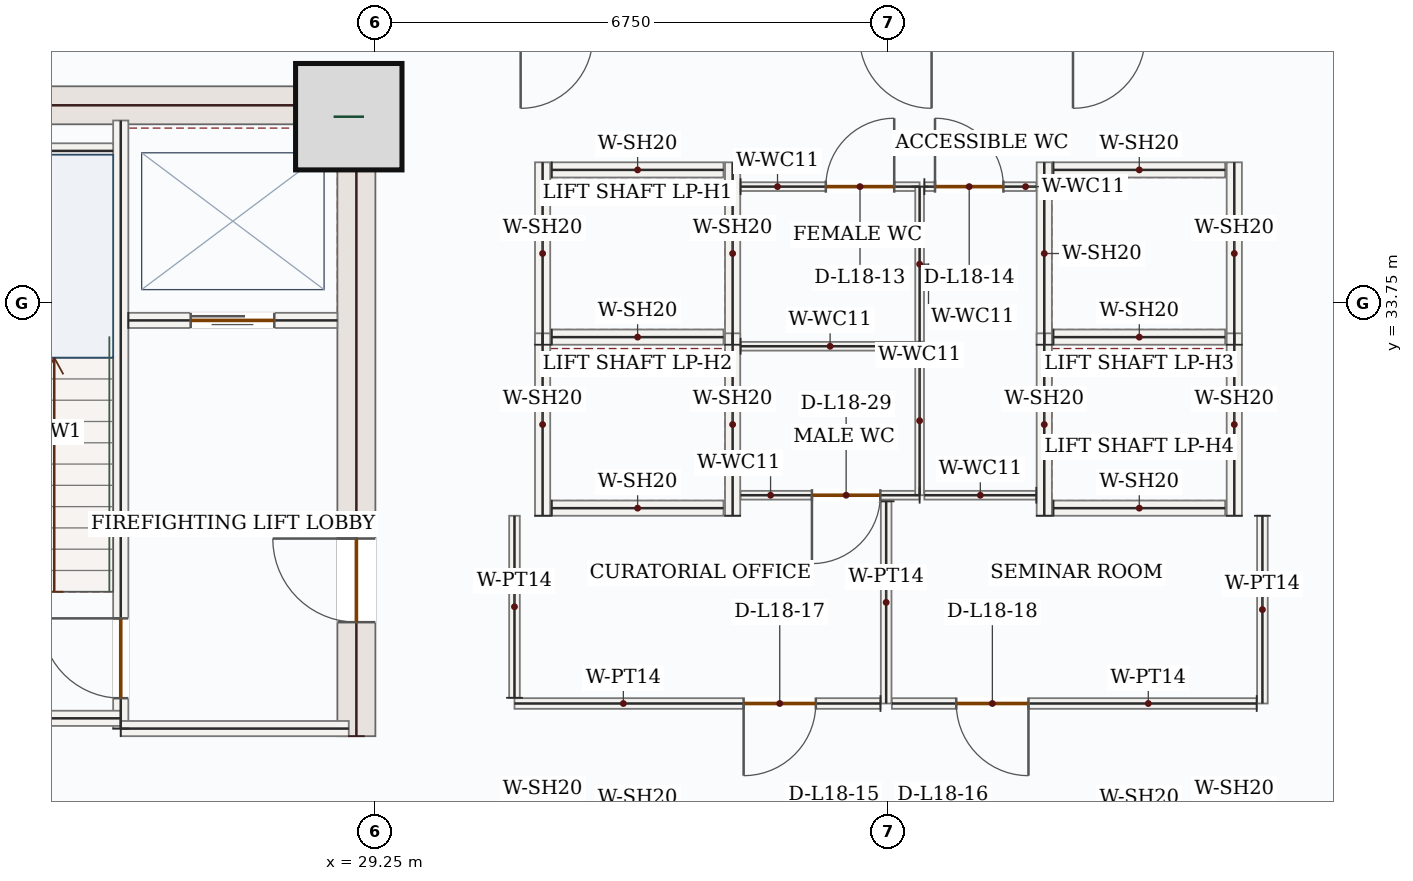
"""IFC4 building model, lengths in metres.
Left out: names, types, materials, properties, quantities, classifications, styles, units other than length and angle.
Written with IfcOpenShell. Run it as: python <this file> out.ifc"""

import sys

from ifc_helpers import new_model, si_unit, direction, frame, frame_2d, origin, origin_2d, place, context, subcontext, project, spatial, rectangle, extrude, source, transform, mapped, element, fill, save


model = new_model("IFC4")
c1 = context("Model", 3, precision=1e-05, world=origin(), true_north=direction((0.0, 1.0)))
c2 = subcontext(c1, "Body", "Model", "MODEL_VIEW")
j1 = project(units=[si_unit("LENGTHUNIT", "METRE"), si_unit("PLANEANGLEUNIT", "RADIAN")], contexts=[c1])
p1 = place(None, origin())
s1 = spatial("IfcSite", under=j1, at=p1, CompositionType="ELEMENT")
p2 = place(p1, origin())
s2 = spatial("IfcBuilding", under=s1, at=p2, CompositionType="ELEMENT")
p3 = place(p2, frame((0.0, 0.0, 83.7)))
s3 = spatial("IfcBuildingStorey", under=s2, at=p3, CompositionType="ELEMENT", Elevation=83.7)
p4 = place(p3, frame((29.0, 28.05, 0.0), z_axis=(0.0, 0.0, 1.0), x_axis=(0.0, 1.0, 0.0)))
e1 = element("IfcWall", 1, at=p4, inside=s3, PredefinedType="SHEAR", context=c2, shape_type="SweptSolid", body=[
    extrude(rectangle(XDim=8.55, YDim=0.5, at=frame_2d((4.275, 0.0))), origin(), (0.0, 0.0, 1.0), 3.95),
])
p5 = place(p4, frame((1.5, 0.0, 0.0)))
e2 = element("IfcOpeningElement", 2, at=p5, cuts=e1, PredefinedType="OPENING", context=c2, shape_type="SweptSolid", body=[
    extrude(rectangle(XDim=1.1, YDim=2.2, at=frame_2d((0.55, 1.1))), frame((0.0, 0.26, 0.0), z_axis=(0.0, -1.0, 0.0), x_axis=(1.0, 0.0, 0.0)), (0.0, 0.0, 1.0), 0.52),
])
m1 = source(origin(), c2, "Body", "SweptSolid", [
    extrude(rectangle(XDim=7.0, YDim=0.5, at=frame_2d((3.5, 0.0))), origin(), (0.0, 0.0, 1.0), 3.95),
])
p6 = place(p3, frame((21.75, 36.35, 0.0), z_axis=(0.0, 0.0, 1.0), x_axis=(1.0, 0.0, 0.0)))
e3 = element("IfcWall", 3, at=p6, inside=s3, PredefinedType="SHEAR", context=c2, shape_type="MappedRepresentation", body=[
    mapped(m1, transform((0.0, 0.0, 0.0), x_axis=(1.0, 0.0, 0.0), y_axis=(0.0, 1.0, 0.0), z_axis=(0.0, 0.0, 1.0), scale=1.0)),
])
m2 = source(origin(), c2, "Body", "SweptSolid", [
    extrude(rectangle(XDim=1.4, YDim=1.4, at=origin_2d()), origin(), (0.0, 0.0, 1.0), 4.2),
])
p7 = place(p3, frame((28.9, 36.2, 0.0), z_axis=(0.0, 0.0, 1.0), x_axis=(1.0, 0.0, 0.0)))
e4 = element("IfcColumn", 4, at=p7, inside=s3, PredefinedType="COLUMN", context=c2, shape_type="MappedRepresentation", body=[
    mapped(m2, transform((0.0, 0.0, 0.0), x_axis=(1.0, 0.0, 0.0), y_axis=(0.0, 1.0, 0.0), z_axis=(0.0, 0.0, 1.0), scale=1.0)),
])
p8 = place(p3, frame((25.9, 28.15, 0.0), z_axis=(0.0, 0.0, 1.0), x_axis=(0.0, 1.0, 0.0)))
e5 = element("IfcWall", 5, at=p8, inside=s3, PredefinedType="SOLIDWALL", context=c2, shape_type="SweptSolid", body=[
    extrude(rectangle(XDim=8.0, YDim=0.2, at=frame_2d((4.0, 0.0))), origin(), (0.0, 0.0, 1.0), 3.95),
])
p9 = place(p8, frame((0.4, 0.0, 0.0)))
e6 = element("IfcOpeningElement", 6, at=p9, cuts=e5, PredefinedType="OPENING", context=c2, shape_type="SweptSolid", body=[
    extrude(rectangle(XDim=1.05, YDim=2.15, at=frame_2d((0.525, 1.075))), frame((0.0, 0.11, 0.0), z_axis=(0.0, -1.0, 0.0), x_axis=(1.0, 0.0, 0.0)), (0.0, 0.0, 1.0), 0.22),
])
m3 = source(origin(), c2, "Body", "SweptSolid", [
    extrude(rectangle(XDim=4.25, YDim=0.2, at=frame_2d((2.125, 0.0))), origin(), (0.0, 0.0, 1.0), 3.95),
])
p10 = place(p3, frame((21.65, 28.285, 0.0), z_axis=(0.0, 0.0, 1.0), x_axis=(1.0, 0.0, 0.0)))
e7 = element("IfcWall", 7, at=p10, inside=s3, PredefinedType="SOLIDWALL", context=c2, shape_type="MappedRepresentation", body=[
    mapped(m3, transform((0.0, 0.0, 0.0), x_axis=(1.0, 0.0, 0.0), y_axis=(0.0, 1.0, 0.0), z_axis=(0.0, 0.0, 1.0), scale=1.0)),
])
m4 = source(origin(), c2, "Body", "SweptSolid", [
    extrude(rectangle(XDim=3.0, YDim=0.2, at=frame_2d((1.5, 0.0))), origin(), (0.0, 0.0, 1.0), 3.95),
])
p11 = place(p3, frame((25.9, 28.15, 0.0), z_axis=(0.0, 0.0, 1.0), x_axis=(1.0, 0.0, 0.0)))
e8 = element("IfcWall", 8, at=p11, inside=s3, PredefinedType="SOLIDWALL", context=c2, shape_type="MappedRepresentation", body=[
    mapped(m4, transform((0.0, 0.0, 0.0), x_axis=(1.0, 0.0, 0.0), y_axis=(0.0, 1.0, 0.0), z_axis=(0.0, 0.0, 1.0), scale=1.0)),
])
m5 = source(origin(), c2, "Body", "SweptSolid", [
    extrude(rectangle(XDim=3.25, YDim=0.2, at=frame_2d((1.625, 0.0))), origin(), (0.0, 0.0, 1.0), 3.95),
])
p12 = place(p3, frame((22.55, 35.75, 0.0), z_axis=(0.0, 0.0, 1.0), x_axis=(1.0, 0.0, 0.0)))
e9 = element("IfcWall", 9, at=p12, inside=s3, PredefinedType="SOLIDWALL", context=c2, shape_type="MappedRepresentation", body=[
    mapped(m5, transform((0.0, 0.0, 0.0), x_axis=(1.0, 0.0, 0.0), y_axis=(0.0, 1.0, 0.0), z_axis=(0.0, 0.0, 1.0), scale=1.0)),
])
p13 = place(p3, frame((26.0, 33.52, 0.0), z_axis=(0.0, 0.0, 1.0), x_axis=(1.0, 0.0, 0.0)))
e10 = element("IfcWall", 10, at=p13, inside=s3, PredefinedType="SOLIDWALL", context=c2, shape_type="SweptSolid", body=[
    extrude(rectangle(XDim=2.75, YDim=0.2, at=frame_2d((1.375, 0.0))), origin(), (0.0, 0.0, 1.0), 3.95),
])
p14 = place(p13, frame((0.82, 0.0, 0.0)))
e11 = element("IfcOpeningElement", 11, at=p14, cuts=e10, PredefinedType="OPENING", context=c2, shape_type="SweptSolid", body=[
    extrude(rectangle(XDim=1.1, YDim=2.15, at=frame_2d((0.55, 1.075))), frame((0.0, 0.11, 0.0), z_axis=(0.0, -1.0, 0.0), x_axis=(1.0, 0.0, 0.0)), (0.0, 0.0, 1.0), 0.22),
])
m6 = source(origin(), c2, "Body", "SweptSolid", [
    extrude(rectangle(XDim=2.4, YDim=0.2, at=frame_2d((1.2, 0.0))), origin(), (0.0, 0.0, 1.0), 3.95),
])
for number, where, z_axis, x_axis in (
    (12, (31.45, 33.2, 0.0), (0.0, 0.0, 1.0), (0.0, 1.0, 0.0)),
    (13, (33.95, 33.2, 0.0), (0.0, 0.0, 1.0), (0.0, 1.0, 0.0)),
):
    element("IfcWall", number, at=place(p3, frame(where, z_axis=z_axis, x_axis=x_axis)), inside=s3, PredefinedType="SOLIDWALL", context=c2, shape_type="MappedRepresentation", body=[
        mapped(m6, transform((0.0, 0.0, 0.0), x_axis=(1.0, 0.0, 0.0), y_axis=(0.0, 1.0, 0.0), z_axis=(0.0, 0.0, 1.0), scale=1.0)),
    ])
m7 = source(origin(), c2, "Body", "SweptSolid", [
    extrude(rectangle(XDim=2.26, YDim=0.2, at=frame_2d((1.13, 0.0))), origin(), (0.0, 0.0, 1.0), 3.95),
])
for number, where, z_axis, x_axis in (
    (14, (31.57, 33.3, 0.0), (0.0, 0.0, 1.0), (1.0, 0.0, 0.0)),
    (15, (31.57, 35.5, 0.0), (0.0, 0.0, 1.0), (1.0, 0.0, 0.0)),
):
    element("IfcWall", number, at=place(p3, frame(where, z_axis=z_axis, x_axis=x_axis)), inside=s3, PredefinedType="SOLIDWALL", context=c2, shape_type="MappedRepresentation", body=[
        mapped(m7, transform((0.0, 0.0, 0.0), x_axis=(1.0, 0.0, 0.0), y_axis=(0.0, 1.0, 0.0), z_axis=(0.0, 0.0, 1.0), scale=1.0)),
    ])
for number, where, z_axis, x_axis in (
    (16, (31.45, 30.95, 0.0), (0.0, 0.0, 1.0), (0.0, 1.0, 0.0)),
    (17, (33.95, 30.95, 0.0), (0.0, 0.0, 1.0), (0.0, 1.0, 0.0)),
):
    element("IfcWall", number, at=place(p3, frame(where, z_axis=z_axis, x_axis=x_axis)), inside=s3, PredefinedType="SOLIDWALL", context=c2, shape_type="MappedRepresentation", body=[
        mapped(m6, transform((0.0, 0.0, 0.0), x_axis=(1.0, 0.0, 0.0), y_axis=(0.0, 1.0, 0.0), z_axis=(0.0, 0.0, 1.0), scale=1.0)),
    ])
p15 = place(p3, frame((31.57, 31.05, 0.0), z_axis=(0.0, 0.0, 1.0), x_axis=(1.0, 0.0, 0.0)))
e18 = element("IfcWall", 18, at=p15, inside=s3, PredefinedType="SOLIDWALL", context=c2, shape_type="MappedRepresentation", body=[
    mapped(m7, transform((0.0, 0.0, 0.0), x_axis=(1.0, 0.0, 0.0), y_axis=(0.0, 1.0, 0.0), z_axis=(0.0, 0.0, 1.0), scale=1.0)),
])
for number, where, z_axis, x_axis in (
    (19, (38.05, 33.2, 0.0), (0.0, 0.0, 1.0), (0.0, 1.0, 0.0)),
    (20, (40.55, 33.2, 0.0), (0.0, 0.0, 1.0), (0.0, 1.0, 0.0)),
):
    element("IfcWall", number, at=place(p3, frame(where, z_axis=z_axis, x_axis=x_axis)), inside=s3, PredefinedType="SOLIDWALL", context=c2, shape_type="MappedRepresentation", body=[
        mapped(m6, transform((0.0, 0.0, 0.0), x_axis=(1.0, 0.0, 0.0), y_axis=(0.0, 1.0, 0.0), z_axis=(0.0, 0.0, 1.0), scale=1.0)),
    ])
for number, where, z_axis, x_axis in (
    (21, (38.17, 33.3, 0.0), (0.0, 0.0, 1.0), (1.0, 0.0, 0.0)),
    (22, (38.17, 35.5, 0.0), (0.0, 0.0, 1.0), (1.0, 0.0, 0.0)),
):
    element("IfcWall", number, at=place(p3, frame(where, z_axis=z_axis, x_axis=x_axis)), inside=s3, PredefinedType="SOLIDWALL", context=c2, shape_type="MappedRepresentation", body=[
        mapped(m7, transform((0.0, 0.0, 0.0), x_axis=(1.0, 0.0, 0.0), y_axis=(0.0, 1.0, 0.0), z_axis=(0.0, 0.0, 1.0), scale=1.0)),
    ])
for number, where, z_axis, x_axis in (
    (23, (38.05, 30.95, 0.0), (0.0, 0.0, 1.0), (0.0, 1.0, 0.0)),
    (24, (40.55, 30.95, 0.0), (0.0, 0.0, 1.0), (0.0, 1.0, 0.0)),
):
    element("IfcWall", number, at=place(p3, frame(where, z_axis=z_axis, x_axis=x_axis)), inside=s3, PredefinedType="SOLIDWALL", context=c2, shape_type="MappedRepresentation", body=[
        mapped(m6, transform((0.0, 0.0, 0.0), x_axis=(1.0, 0.0, 0.0), y_axis=(0.0, 1.0, 0.0), z_axis=(0.0, 0.0, 1.0), scale=1.0)),
    ])
p16 = place(p3, frame((38.17, 31.05, 0.0), z_axis=(0.0, 0.0, 1.0), x_axis=(1.0, 0.0, 0.0)))
e25 = element("IfcWall", 25, at=p16, inside=s3, PredefinedType="SOLIDWALL", context=c2, shape_type="MappedRepresentation", body=[
    mapped(m7, transform((0.0, 0.0, 0.0), x_axis=(1.0, 0.0, 0.0), y_axis=(0.0, 1.0, 0.0), z_axis=(0.0, 0.0, 1.0), scale=1.0)),
])
p17 = place(p3, frame((36.41, 31.22, 0.0), z_axis=(0.0, 0.0, 1.0), x_axis=(-1.0, 0.0, 0.0)))
e26 = element("IfcWall", 26, at=p17, inside=s3, PredefinedType="PARTITIONING", context=c2, shape_type="SweptSolid", body=[
    extrude(rectangle(XDim=2.355, YDim=0.115, at=frame_2d((1.177, 0.0))), origin(), (0.0, 0.0, 1.0), 3.95),
])
p18 = place(p17, frame((0.517, 0.0, 0.0)))
e27 = element("IfcOpeningElement", 27, at=p18, cuts=e26, PredefinedType="OPENING", context=c2, shape_type="SweptSolid", body=[
    extrude(rectangle(XDim=0.9, YDim=2.1, at=frame_2d((0.45, 1.05))), frame((0.0, 0.067, 0.0), z_axis=(0.0, -1.0, 0.0), x_axis=(1.0, 0.0, 0.0)), (0.0, 0.0, 1.0), 0.135),
])
m8 = source(origin(), c2, "Body", "SweptSolid", [
    extrude(rectangle(XDim=2.355, YDim=0.115, at=frame_2d((1.177, 0.0))), origin(), (0.0, 0.0, 1.0), 3.95),
])
p19 = place(p3, frame((34.055, 33.18, 0.0), z_axis=(0.0, 0.0, 1.0), x_axis=(1.0, 0.0, 0.0)))
e28 = element("IfcWall", 28, at=p19, inside=s3, PredefinedType="PARTITIONING", context=c2, shape_type="MappedRepresentation", body=[
    mapped(m8, transform((0.0, 0.0, 0.0), x_axis=(1.0, 0.0, 0.0), y_axis=(0.0, 1.0, 0.0), z_axis=(0.0, 0.0, 1.0), scale=1.0)),
])
m9 = source(origin(), c2, "Body", "SweptSolid", [
    extrude(rectangle(XDim=1.96, YDim=0.115, at=frame_2d((0.98, 0.0))), origin(), (0.0, 0.0, 1.0), 3.95),
])
p20 = place(p3, frame((36.41, 33.18, 0.0), z_axis=(0.0, 0.0, 1.0), x_axis=(0.0, -1.0, 0.0)))
e29 = element("IfcWall", 29, at=p20, inside=s3, PredefinedType="PARTITIONING", context=c2, shape_type="MappedRepresentation", body=[
    mapped(m9, transform((0.0, 0.0, 0.0), x_axis=(1.0, 0.0, 0.0), y_axis=(0.0, 1.0, 0.0), z_axis=(0.0, 0.0, 1.0), scale=1.0)),
])
p21 = place(p3, frame((34.055, 35.28, 0.0), z_axis=(0.0, 0.0, 1.0), x_axis=(1.0, 0.0, 0.0)))
e30 = element("IfcWall", 30, at=p21, inside=s3, PredefinedType="PARTITIONING", context=c2, shape_type="SweptSolid", body=[
    extrude(rectangle(XDim=2.355, YDim=0.115, at=frame_2d((1.177, 0.0))), origin(), (0.0, 0.0, 1.0), 3.95),
])
p22 = place(p21, frame((1.121, 0.0, 0.0)))
e31 = element("IfcOpeningElement", 31, at=p22, cuts=e30, PredefinedType="OPENING", context=c2, shape_type="SweptSolid", body=[
    extrude(rectangle(XDim=0.9, YDim=2.1, at=frame_2d((0.45, 1.05))), frame((0.0, 0.067, 0.0), z_axis=(0.0, -1.0, 0.0), x_axis=(1.0, 0.0, 0.0)), (0.0, 0.0, 1.0), 0.135),
])
m10 = source(origin(), c2, "Body", "SweptSolid", [
    extrude(rectangle(XDim=2.04, YDim=0.115, at=frame_2d((1.02, 0.0))), origin(), (0.0, 0.0, 1.0), 3.95),
])
p23 = place(p3, frame((36.41, 35.28, 0.0), z_axis=(0.0, 0.0, 1.0), x_axis=(0.0, -1.0, 0.0)))
e32 = element("IfcWall", 32, at=p23, inside=s3, PredefinedType="PARTITIONING", context=c2, shape_type="MappedRepresentation", body=[
    mapped(m10, transform((0.0, 0.0, 0.0), x_axis=(1.0, 0.0, 0.0), y_axis=(0.0, 1.0, 0.0), z_axis=(0.0, 0.0, 1.0), scale=1.0)),
])
m11 = source(origin(), c2, "Body", "SweptSolid", [
    extrude(rectangle(XDim=1.473, YDim=0.115, at=frame_2d((0.736, 0.0))), origin(), (0.0, 0.0, 1.0), 3.95),
])
p24 = place(p3, frame((37.945, 31.22, 0.0), z_axis=(0.0, 0.0, 1.0), x_axis=(-1.0, 0.0, 0.0)))
e33 = element("IfcWall", 33, at=p24, inside=s3, PredefinedType="PARTITIONING", context=c2, shape_type="MappedRepresentation", body=[
    mapped(m11, transform((0.0, 0.0, 0.0), x_axis=(1.0, 0.0, 0.0), y_axis=(0.0, 1.0, 0.0), z_axis=(0.0, 0.0, 1.0), scale=1.0)),
])
p25 = place(p3, frame((36.472, 35.28, 0.0), z_axis=(0.0, 0.0, 1.0), x_axis=(1.0, 0.0, 0.0)))
e34 = element("IfcWall", 34, at=p25, inside=s3, PredefinedType="PARTITIONING", context=c2, shape_type="SweptSolid", body=[
    extrude(rectangle(XDim=1.473, YDim=0.115, at=frame_2d((0.736, 0.0))), origin(), (0.0, 0.0, 1.0), 3.95),
])
p26 = place(p25, frame((0.14, 0.0, 0.0)))
e35 = element("IfcOpeningElement", 35, at=p26, cuts=e34, PredefinedType="OPENING", context=c2, shape_type="SweptSolid", body=[
    extrude(rectangle(XDim=0.9, YDim=2.1, at=frame_2d((0.45, 1.05))), frame((0.0, 0.067, 0.0), z_axis=(0.0, -1.0, 0.0), x_axis=(1.0, 0.0, 0.0)), (0.0, 0.0, 1.0), 0.135),
])
m12 = source(origin(), c2, "Body", "SweptSolid", [
    extrude(rectangle(XDim=2.66, YDim=0.14, at=frame_2d((1.33, 0.0))), origin(), (0.0, 0.0, 1.0), 3.95),
])
p27 = place(p3, frame((35.97, 31.14, 0.0), z_axis=(0.0, 0.0, 1.0), x_axis=(0.0, -1.0, 0.0)))
e36 = element("IfcWall", 36, at=p27, inside=s3, PredefinedType="PARTITIONING", context=c2, shape_type="MappedRepresentation", body=[
    mapped(m12, transform((0.0, 0.0, 0.0), x_axis=(1.0, 0.0, 0.0), y_axis=(0.0, 1.0, 0.0), z_axis=(0.0, 0.0, 1.0), scale=1.0)),
])
p28 = place(p3, frame((35.895, 28.48, 0.0), z_axis=(0.0, 0.0, 1.0), x_axis=(-1.0, 0.0, 0.0)))
e37 = element("IfcWall", 37, at=p28, inside=s3, PredefinedType="PARTITIONING", context=c2, shape_type="SweptSolid", body=[
    extrude(rectangle(XDim=4.815, YDim=0.14, at=frame_2d((2.407, 0.0))), origin(), (0.0, 0.0, 1.0), 3.95),
])
p29 = place(p28, frame((0.85, 0.0, 0.0)))
e38 = element("IfcOpeningElement", 38, at=p29, cuts=e37, PredefinedType="OPENING", context=c2, shape_type="SweptSolid", body=[
    extrude(rectangle(XDim=0.95, YDim=2.15, at=frame_2d((0.475, 1.075))), frame((0.0, 0.08, 0.0), z_axis=(0.0, -1.0, 0.0), x_axis=(1.0, 0.0, 0.0)), (0.0, 0.0, 1.0), 0.16),
])
m13 = source(origin(), c2, "Body", "SweptSolid", [
    extrude(rectangle(XDim=2.395, YDim=0.14, at=frame_2d((1.198, 0.0))), origin(), (0.0, 0.0, 1.0), 3.95),
])
p30 = place(p3, frame((31.08, 28.555, 0.0), z_axis=(0.0, 0.0, 1.0), x_axis=(0.0, 1.0, 0.0)))
e39 = element("IfcWall", 39, at=p30, inside=s3, PredefinedType="PARTITIONING", context=c2, shape_type="MappedRepresentation", body=[
    mapped(m13, transform((0.0, 0.0, 0.0), x_axis=(1.0, 0.0, 0.0), y_axis=(0.0, 1.0, 0.0), z_axis=(0.0, 0.0, 1.0), scale=1.0)),
])
m14 = source(origin(), c2, "Body", "SweptSolid", [
    extrude(rectangle(XDim=2.47, YDim=0.14, at=frame_2d((1.235, 0.0))), origin(), (0.0, 0.0, 1.0), 3.95),
])
p31 = place(p3, frame((40.92, 30.95, 0.0), z_axis=(0.0, 0.0, 1.0), x_axis=(0.0, -1.0, 0.0)))
e40 = element("IfcWall", 40, at=p31, inside=s3, PredefinedType="PARTITIONING", context=c2, shape_type="MappedRepresentation", body=[
    mapped(m14, transform((0.0, 0.0, 0.0), x_axis=(1.0, 0.0, 0.0), y_axis=(0.0, 1.0, 0.0), z_axis=(0.0, 0.0, 1.0), scale=1.0)),
])
p32 = place(p3, frame((40.845, 28.48, 0.0), z_axis=(0.0, 0.0, 1.0), x_axis=(-1.0, 0.0, 0.0)))
e41 = element("IfcWall", 41, at=p32, inside=s3, PredefinedType="PARTITIONING", context=c2, shape_type="SweptSolid", body=[
    extrude(rectangle(XDim=4.8, YDim=0.14, at=frame_2d((2.4, 0.0))), origin(), (0.0, 0.0, 1.0), 3.95),
])
p33 = place(p32, frame((3.003, 0.0, 0.0)))
e42 = element("IfcOpeningElement", 42, at=p33, cuts=e41, PredefinedType="OPENING", context=c2, shape_type="SweptSolid", body=[
    extrude(rectangle(XDim=0.95, YDim=2.15, at=frame_2d((0.475, 1.075))), frame((0.0, 0.08, 0.0), z_axis=(0.0, -1.0, 0.0), x_axis=(1.0, 0.0, 0.0)), (0.0, 0.0, 1.0), 0.16),
])
m15 = source(origin(), c2, "Body", "SweptSolid", [
    extrude(rectangle(XDim=1.05, YDim=2.15, at=frame_2d((0.525, 1.075))), frame((0.0, 0.025, 0.0), z_axis=(0.0, -1.0, 0.0), x_axis=(1.0, 0.0, 0.0)), (0.0, 0.0, 1.0), 0.05),
])
p34 = place(p9, origin())
e43 = element("IfcDoor", 43, at=p34, inside=s3, OperationType="SINGLE_SWING_RIGHT", PredefinedType="DOOR", context=c2, shape_type="MappedRepresentation", body=[
    mapped(m15, transform((0.0, 0.0, 0.0), x_axis=(1.0, 0.0, 0.0), y_axis=(0.0, 1.0, 0.0), z_axis=(0.0, 0.0, 1.0), scale=1.0)),
])
fill(e6, e43)
m16 = source(origin(), c2, "Body", "SweptSolid", [
    extrude(rectangle(XDim=1.1, YDim=2.15, at=frame_2d((0.55, 1.075))), frame((0.0, 0.025, 0.0), z_axis=(0.0, -1.0, 0.0), x_axis=(1.0, 0.0, 0.0)), (0.0, 0.0, 1.0), 0.05),
])
p35 = place(p14, origin())
e44 = element("IfcDoor", 44, at=p35, inside=s3, OperationType="DOUBLE_DOOR_SLIDING", PredefinedType="DOOR", context=c2, shape_type="MappedRepresentation", body=[
    mapped(m16, transform((0.0, 0.0, 0.0), x_axis=(1.0, 0.0, 0.0), y_axis=(0.0, 1.0, 0.0), z_axis=(0.0, 0.0, 1.0), scale=1.0)),
])
fill(e11, e44)
m17 = source(origin(), c2, "Body", "SweptSolid", [
    extrude(rectangle(XDim=1.1, YDim=2.2, at=frame_2d((0.55, 1.1))), frame((0.0, 0.025, 0.0), z_axis=(0.0, -1.0, 0.0), x_axis=(1.0, 0.0, 0.0)), (0.0, 0.0, 1.0), 0.05),
])
p36 = place(p5, origin())
e45 = element("IfcDoor", 45, at=p36, inside=s3, OperationType="SINGLE_SWING_RIGHT", PredefinedType="DOOR", context=c2, shape_type="MappedRepresentation", body=[
    mapped(m17, transform((0.0, 0.0, 0.0), x_axis=(1.0, 0.0, 0.0), y_axis=(0.0, 1.0, 0.0), z_axis=(0.0, 0.0, 1.0), scale=1.0)),
])
fill(e2, e45)
m18 = source(origin(), c2, "Body", "SweptSolid", [
    extrude(rectangle(XDim=0.9, YDim=2.1, at=frame_2d((0.45, 1.05))), frame((0.0, 0.025, 0.0), z_axis=(0.0, -1.0, 0.0), x_axis=(1.0, 0.0, 0.0)), (0.0, 0.0, 1.0), 0.05),
])
p37 = place(p22, origin())
e46 = element("IfcDoor", 46, at=p37, inside=s3, OperationType="SINGLE_SWING_RIGHT", PredefinedType="DOOR", context=c2, shape_type="MappedRepresentation", body=[
    mapped(m18, transform((0.0, 0.0, 0.0), x_axis=(1.0, 0.0, 0.0), y_axis=(0.0, 1.0, 0.0), z_axis=(0.0, 0.0, 1.0), scale=1.0)),
])
fill(e31, e46)
p38 = place(p26, origin())
e47 = element("IfcDoor", 47, at=p38, inside=s3, OperationType="SINGLE_SWING_LEFT", PredefinedType="DOOR", context=c2, shape_type="MappedRepresentation", body=[
    mapped(m18, transform((0.0, 0.0, 0.0), x_axis=(1.0, 0.0, 0.0), y_axis=(0.0, 1.0, 0.0), z_axis=(0.0, 0.0, 1.0), scale=1.0)),
])
fill(e35, e47)
m19 = source(origin(), c2, "Body", "SweptSolid", [
    extrude(rectangle(XDim=0.95, YDim=2.15, at=frame_2d((0.475, 1.075))), frame((0.0, 0.025, 0.0), z_axis=(0.0, -1.0, 0.0), x_axis=(1.0, 0.0, 0.0)), (0.0, 0.0, 1.0), 0.05),
])
p39 = place(p29, origin())
e48 = element("IfcDoor", 48, at=p39, inside=s3, OperationType="SINGLE_SWING_RIGHT", PredefinedType="DOOR", context=c2, shape_type="MappedRepresentation", body=[
    mapped(m19, transform((0.0, 0.0, 0.0), x_axis=(1.0, 0.0, 0.0), y_axis=(0.0, 1.0, 0.0), z_axis=(0.0, 0.0, 1.0), scale=1.0)),
])
fill(e38, e48)
p40 = place(p33, origin())
e49 = element("IfcDoor", 49, at=p40, inside=s3, OperationType="SINGLE_SWING_LEFT", PredefinedType="DOOR", context=c2, shape_type="MappedRepresentation", body=[
    mapped(m19, transform((0.0, 0.0, 0.0), x_axis=(1.0, 0.0, 0.0), y_axis=(0.0, 1.0, 0.0), z_axis=(0.0, 0.0, 1.0), scale=1.0)),
])
fill(e42, e49)
p41 = place(p18, origin())
e50 = element("IfcDoor", 50, at=p41, inside=s3, OperationType="SINGLE_SWING_RIGHT", PredefinedType="DOOR", context=c2, shape_type="MappedRepresentation", body=[
    mapped(m18, transform((0.0, 0.0, 0.0), x_axis=(1.0, 0.0, 0.0), y_axis=(0.0, 1.0, 0.0), z_axis=(0.0, 0.0, 1.0), scale=1.0)),
])
fill(e27, e50)
save(model, sys.argv[1])
